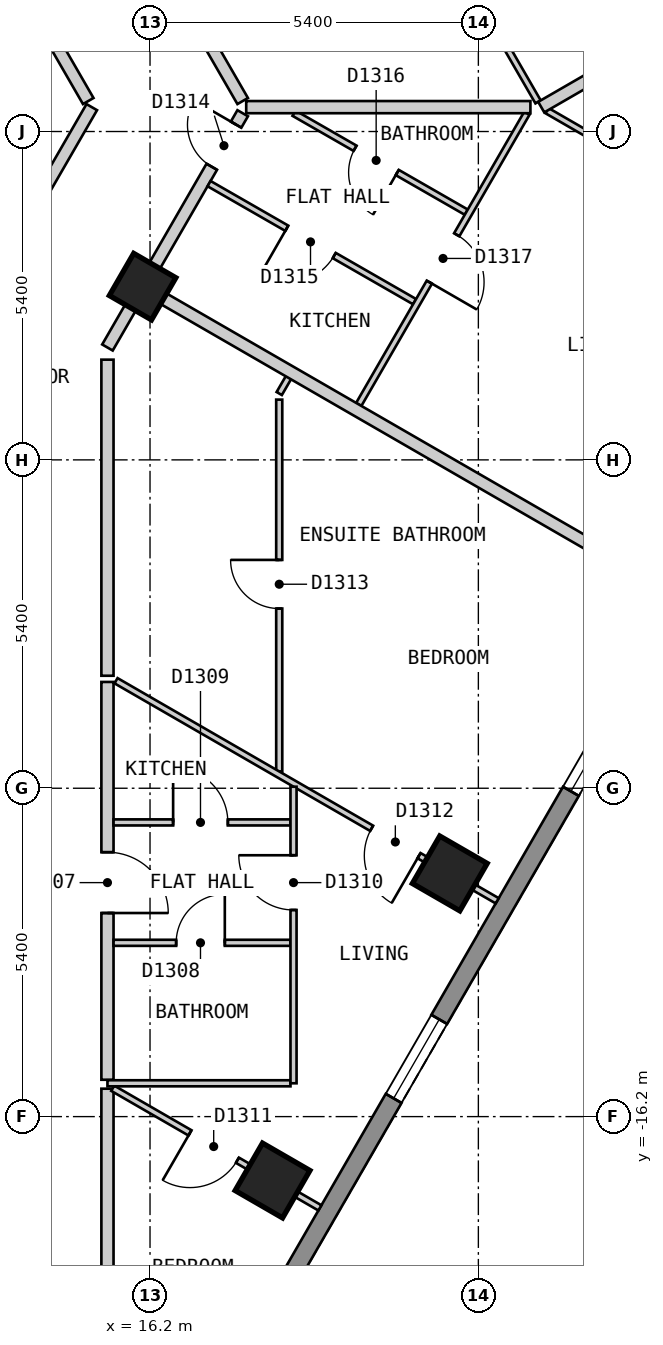
"""IFC4 building model, lengths in metres.
Left out: names, types, materials, properties, quantities, classifications, styles, units other than length and angle.
Written with IfcOpenShell. Run it as: python <this file> out.ifc"""

import sys

from ifc_helpers import new_model, si_unit, direction, frame, frame_2d, origin, origin_2d, place, context, subcontext, project, spatial, polyline, rectangle, outline, extrude, element, fill, save


model = new_model("IFC4")
c1 = context("Model", 3, precision=1e-05, world=origin(), true_north=direction((0.0, 1.0)))
c2 = subcontext(c1, "Body", "Model", "MODEL_VIEW")
j1 = project(units=[si_unit("LENGTHUNIT", "METRE"), si_unit("PLANEANGLEUNIT", "RADIAN")], contexts=[c1])
p1 = place(None, origin())
s1 = spatial("IfcSite", under=j1, at=p1, CompositionType="ELEMENT")
p2 = place(p1, origin())
s2 = spatial("IfcBuilding", under=s1, at=p2, CompositionType="ELEMENT")
p3 = place(p2, frame((0.0, 0.0, 135.6)))
s3 = spatial("IfcBuildingStorey", under=s2, at=p3, CompositionType="ELEMENT", Elevation=135.6)
for number, where, z_axis, x_axis in (
    (1, (18.215, -17.251, 0.0), (0.0, 0.0, 1.0), (0.5, 0.866, 0.0)),
    (2, (21.13, -12.201, 0.0), (0.0, 0.0, 1.0), (0.5, 0.866, 0.0)),
):
    element("IfcColumn", number, at=place(p3, frame(where, z_axis=z_axis, x_axis=x_axis)), inside=s3, PredefinedType="COLUMN", context=c2, shape_type="SweptSolid", body=[
        extrude(rectangle(XDim=0.9, YDim=0.9, at=origin_2d()), origin(), (0.0, 0.0, 1.0), 3.0),
    ])
p4 = place(p3, frame((16.078, -2.551, 0.0), z_axis=(0.0, 0.0, 1.0), x_axis=(0.5, 0.866025403784, 0.0)))
e3 = element("IfcColumn", 3, at=p4, inside=s3, PredefinedType="COLUMN", context=c2, shape_type="SweptSolid", body=[
    extrude(rectangle(XDim=0.8, YDim=0.8, at=origin_2d()), origin(), (0.0, 0.0, 1.0), 3.0),
])
p5 = place(p3, frame((15.862, -23.425, 0.0), z_axis=(0.0, 0.0, 1.0), x_axis=(0.500017503135, 0.866015298109, 0.0)))
e4 = element("IfcWall", 4, at=p5, inside=s3, PredefinedType="SOLIDWALL", context=c2, shape_type="SweptSolid", body=[
    extrude(outline(polyline([(0.0, -0.15), (24.711, -0.15), (24.631, 0.15), (0.08, 0.15), (0.0, -0.15)])), origin(), (0.0, 0.0, 1.0), 2.7),
])
p6 = place(p5, frame((2.857, 0.0, 0.15)))
e5 = element("IfcOpeningElement", 5, at=p6, cuts=e4, PredefinedType="OPENING", context=c2, shape_type="SweptSolid", body=[
    extrude(rectangle(XDim=1.5, YDim=2.1, at=frame_2d((0.75, 1.05))), frame((0.0, 0.16, 0.0), z_axis=(0.0, -1.0, 0.0), x_axis=(1.0, 0.0, 0.0)), (0.0, 0.0, 1.0), 0.32),
])
p7 = place(p5, frame((8.689, 0.0, 0.15)))
e6 = element("IfcOpeningElement", 6, at=p7, cuts=e4, PredefinedType="OPENING", context=c2, shape_type="SweptSolid", body=[
    extrude(rectangle(XDim=1.5, YDim=2.1, at=frame_2d((0.75, 1.05))), frame((0.0, 0.16, 0.0), z_axis=(0.0, -1.0, 0.0), x_axis=(1.0, 0.0, 0.0)), (0.0, 0.0, 1.0), 0.32),
])
p8 = place(p5, frame((14.52, 0.0, 0.15)))
e7 = element("IfcOpeningElement", 7, at=p8, cuts=e4, PredefinedType="OPENING", context=c2, shape_type="SweptSolid", body=[
    extrude(rectangle(XDim=1.5, YDim=2.1, at=frame_2d((0.75, 1.05))), frame((0.0, 0.16, 0.0), z_axis=(0.0, -1.0, 0.0), x_axis=(1.0, 0.0, 0.0)), (0.0, 0.0, 1.0), 0.32),
])
p9 = place(p5, frame((20.351, 0.0, 0.15)))
e8 = element("IfcOpeningElement", 8, at=p9, cuts=e4, PredefinedType="OPENING", context=c2, shape_type="SweptSolid", body=[
    extrude(rectangle(XDim=1.5, YDim=2.1, at=frame_2d((0.75, 1.05))), frame((0.0, 0.16, 0.0), z_axis=(0.0, -1.0, 0.0), x_axis=(1.0, 0.0, 0.0)), (0.0, 0.0, 1.0), 0.32),
])
p10 = place(p3, frame((7.967, 13.0, 0.0), z_axis=(0.0, 0.0, 1.0), x_axis=(0.50003774998, -0.866003607726, 0.0)))
e9 = element("IfcWall", 9, at=p10, inside=s3, PredefinedType="PARTITIONING", context=c2, shape_type="SweptSolid", body=[
    extrude(rectangle(XDim=14.433, YDim=0.2, at=frame_2d((7.217, 0.0))), origin(), (0.0, 0.0, 1.0), 2.7),
])
p11 = place(p10, frame((6.824, 0.0, 0.0)))
e10 = element("IfcOpeningElement", 10, at=p11, cuts=e9, PredefinedType="OPENING", context=c2, shape_type="SweptSolid", body=[
    extrude(rectangle(XDim=0.9, YDim=2.1, at=frame_2d((0.45, 1.05))), frame((0.0, 0.11, 0.0), z_axis=(0.0, -1.0, 0.0), x_axis=(1.0, 0.0, 0.0)), (0.0, 0.0, 1.0), 0.22),
])
p12 = place(p3, frame((9.296, 15.1, 0.0), z_axis=(0.0, 0.0, 1.0), x_axis=(0.499974024244, -0.866040400375, 0.0)))
e11 = element("IfcWall", 11, at=p12, inside=s3, PredefinedType="PARTITIONING", context=c2, shape_type="SweptSolid", body=[
    extrude(rectangle(XDim=16.857, YDim=0.2, at=frame_2d((8.429, 0.0))), origin(), (0.0, 0.0, 1.0), 2.7),
])
p13 = place(p12, frame((5.209, 0.0, 0.0)))
e12 = element("IfcOpeningElement", 12, at=p13, cuts=e11, PredefinedType="OPENING", context=c2, shape_type="SweptSolid", body=[
    extrude(rectangle(XDim=1.0, YDim=2.1, at=frame_2d((0.5, 1.05))), frame((0.0, 0.11, 0.0), z_axis=(0.0, -1.0, 0.0), x_axis=(1.0, 0.0, 0.0)), (0.0, 0.0, 1.0), 0.22),
])
p14 = place(p3, frame((15.5, -3.752, 0.0), z_axis=(0.0, 0.0, 1.0), x_axis=(0.0, -1.0, 0.0)))
e13 = element("IfcWall", 13, at=p14, inside=s3, PredefinedType="PARTITIONING", context=c2, shape_type="SweptSolid", body=[
    extrude(rectangle(XDim=5.198, YDim=0.2, at=frame_2d((2.599, 0.0))), origin(), (0.0, 0.0, 1.0), 2.7),
])
p15 = place(p3, frame((13.394, -2.8, 0.0), z_axis=(0.0, 0.0, 1.0), x_axis=(0.499968324138, 0.866043691079, 0.0)))
e14 = element("IfcWall", 14, at=p15, inside=s3, PredefinedType="PARTITIONING", context=c2, shape_type="SweptSolid", body=[
    extrude(rectangle(XDim=3.696, YDim=0.2, at=frame_2d((1.848, 0.0))), origin(), (0.0, 0.0, 1.0), 2.7),
])
p16 = place(p3, frame((15.5, -3.552, 0.0), z_axis=(0.0, 0.0, 1.0), x_axis=(0.499928303779, 0.86606679366, 0.0)))
e15 = element("IfcWall", 15, at=p16, inside=s3, PredefinedType="PARTITIONING", context=c2, shape_type="SweptSolid", body=[
    extrude(rectangle(XDim=4.449, YDim=0.2, at=frame_2d((2.225, 0.0))), origin(), (0.0, 0.0, 1.0), 2.7),
])
p17 = place(p16, frame((3.432, 0.0, 0.0)))
e16 = element("IfcOpeningElement", 16, at=p17, cuts=e15, PredefinedType="OPENING", context=c2, shape_type="SweptSolid", body=[
    extrude(rectangle(XDim=0.8, YDim=2.1, at=frame_2d((0.4, 1.05))), frame((0.0, 0.11, 0.0), z_axis=(0.0, -1.0, 0.0), x_axis=(1.0, 0.0, 0.0)), (0.0, 0.0, 1.0), 0.22),
])
p18 = place(p3, frame((15.5, -21.199, 0.0), z_axis=(0.0, 0.0, 1.0), x_axis=(0.0, 1.0, 0.0)))
e17 = element("IfcWall", 17, at=p18, inside=s3, PredefinedType="PARTITIONING", context=c2, shape_type="SweptSolid", body=[
    extrude(rectangle(XDim=5.458, YDim=0.2, at=frame_2d((2.729, 0.0))), origin(), (0.0, 0.0, 1.0), 2.7),
])
p19 = place(p3, frame((15.5, -15.594, 0.0), z_axis=(0.0, 0.0, 1.0), x_axis=(0.0, 1.0, 0.0)))
e18 = element("IfcWall", 18, at=p19, inside=s3, PredefinedType="PARTITIONING", context=c2, shape_type="SweptSolid", body=[
    extrude(rectangle(XDim=6.542, YDim=0.2, at=frame_2d((3.271, 0.0))), origin(), (0.0, 0.0, 1.0), 2.7),
])
p20 = place(p19, frame((2.742, 0.0, 0.0)))
e19 = element("IfcOpeningElement", 19, at=p20, cuts=e18, PredefinedType="OPENING", context=c2, shape_type="SweptSolid", body=[
    extrude(rectangle(XDim=1.0, YDim=2.1, at=frame_2d((0.5, 1.05))), frame((0.0, 0.11, 0.0), z_axis=(0.0, -1.0, 0.0), x_axis=(1.0, 0.0, 0.0)), (0.0, 0.0, 1.0), 0.22),
])
p21 = place(p3, frame((11.713, 19.313, 0.0), z_axis=(0.0, 0.0, 1.0), x_axis=(0.499999523185, -0.866025679073, 0.0)))
e20 = element("IfcWall", 20, at=p21, inside=s3, PredefinedType="PARTITIONING", context=c2, shape_type="SweptSolid", body=[
    extrude(rectangle(XDim=21.738, YDim=0.1, at=frame_2d((10.869, 0.0))), origin(), (0.0, 0.0, 1.0), 2.7),
])
p22 = place(p21, frame((7.654, 0.0, 0.0)))
e21 = element("IfcOpeningElement", 21, at=p22, cuts=e20, PredefinedType="OPENING", context=c2, shape_type="SweptSolid", body=[
    extrude(rectangle(XDim=0.9, YDim=2.1, at=frame_2d((0.45, 1.05))), frame((0.0, 0.06, 0.0), z_axis=(0.0, -1.0, 0.0), x_axis=(1.0, 0.0, 0.0)), (0.0, 0.0, 1.0), 0.12),
])
p23 = place(p21, frame((13.202, 0.0, 0.0)))
e22 = element("IfcOpeningElement", 22, at=p23, cuts=e20, PredefinedType="OPENING", context=c2, shape_type="SweptSolid", body=[
    extrude(rectangle(XDim=0.8, YDim=2.1, at=frame_2d((0.4, 1.05))), frame((0.0, 0.06, 0.0), z_axis=(0.0, -1.0, 0.0), x_axis=(1.0, 0.0, 0.0)), (0.0, 0.0, 1.0), 0.12),
])
p24 = place(p21, frame((2.242, 0.0, 0.0)))
e23 = element("IfcOpeningElement", 23, at=p24, cuts=e20, PredefinedType="OPENING", context=c2, shape_type="SweptSolid", body=[
    extrude(rectangle(XDim=0.8, YDim=2.1, at=frame_2d((0.4, 1.05))), frame((0.0, 0.06, 0.0), z_axis=(0.0, -1.0, 0.0), x_axis=(1.0, 0.0, 0.0)), (0.0, 0.0, 1.0), 0.12),
])
p25 = place(p21, frame((18.696, 0.0, 0.0)))
e24 = element("IfcOpeningElement", 24, at=p25, cuts=e20, PredefinedType="OPENING", context=c2, shape_type="SweptSolid", body=[
    extrude(rectangle(XDim=0.8, YDim=2.1, at=frame_2d((0.4, 1.05))), frame((0.0, 0.06, 0.0), z_axis=(0.0, -1.0, 0.0), x_axis=(1.0, 0.0, 0.0)), (0.0, 0.0, 1.0), 0.12),
])
p26 = place(p3, frame((18.325, -4.409, 0.0), z_axis=(0.0, 0.0, 1.0), x_axis=(0.0, -1.0, 0.0)))
e25 = element("IfcWall", 25, at=p26, inside=s3, PredefinedType="PARTITIONING", context=c2, shape_type="SweptSolid", body=[
    extrude(rectangle(XDim=6.115, YDim=0.1, at=frame_2d((3.058, 0.0))), origin(), (0.0, 0.0, 1.0), 2.7),
])
p27 = place(p26, frame((2.636, 0.0, 0.0)))
e26 = element("IfcOpeningElement", 26, at=p27, cuts=e25, PredefinedType="OPENING", context=c2, shape_type="SweptSolid", body=[
    extrude(rectangle(XDim=0.8, YDim=2.1, at=frame_2d((0.4, 1.05))), frame((0.0, 0.06, 0.0), z_axis=(0.0, -1.0, 0.0), x_axis=(1.0, 0.0, 0.0)), (0.0, 0.0, 1.0), 0.12),
])
p28 = place(p3, frame((15.587, -15.734, 0.0), z_axis=(0.0, 0.0, 1.0), x_axis=(0.866023334807, -0.500003583557, 0.0)))
e27 = element("IfcWall", 27, at=p28, inside=s3, PredefinedType="PARTITIONING", context=c2, shape_type="SweptSolid", body=[
    extrude(rectangle(XDim=3.934, YDim=0.1, at=frame_2d((1.967, 0.0))), origin(), (0.0, 0.0, 1.0), 2.7),
])
p29 = place(p28, frame((1.467, 0.0, 0.0)))
e28 = element("IfcOpeningElement", 28, at=p29, cuts=e27, PredefinedType="OPENING", context=c2, shape_type="SweptSolid", body=[
    extrude(rectangle(XDim=0.9, YDim=2.1, at=frame_2d((0.45, 1.05))), frame((0.0, 0.06, 0.0), z_axis=(0.0, -1.0, 0.0), x_axis=(1.0, 0.0, 0.0)), (0.0, 0.0, 1.0), 0.12),
])
p30 = place(p3, frame((15.641, -9.032, 0.0), z_axis=(0.0, 0.0, 1.0), x_axis=(0.866049104564, -0.499958946799, 0.0)))
e29 = element("IfcWall", 29, at=p30, inside=s3, PredefinedType="PARTITIONING", context=c2, shape_type="SweptSolid", body=[
    extrude(rectangle(XDim=7.238, YDim=0.1, at=frame_2d((3.619, 0.0))), origin(), (0.0, 0.0, 1.0), 2.7),
])
p31 = place(p30, frame((4.854, 0.0, 0.0)))
e30 = element("IfcOpeningElement", 30, at=p31, cuts=e29, PredefinedType="OPENING", context=c2, shape_type="SweptSolid", body=[
    extrude(rectangle(XDim=0.9, YDim=2.1, at=frame_2d((0.45, 1.05))), frame((0.0, 0.06, 0.0), z_axis=(0.0, -1.0, 0.0), x_axis=(1.0, 0.0, 0.0)), (0.0, 0.0, 1.0), 0.12),
])
p32 = place(p3, frame((17.171, -0.857, 0.0), z_axis=(0.0, 0.0, 1.0), x_axis=(0.867173455867, -0.49800622229, 0.0)))
e31 = element("IfcWall", 31, at=p32, inside=s3, PredefinedType="PARTITIONING", context=c2, shape_type="SweptSolid", body=[
    extrude(rectangle(XDim=3.898, YDim=0.1, at=frame_2d((1.949, 0.0))), origin(), (0.0, 0.0, 1.0), 2.7),
])
p33 = place(p32, frame((1.474, 0.0, 0.0)))
e32 = element("IfcOpeningElement", 32, at=p33, cuts=e31, PredefinedType="OPENING", context=c2, shape_type="SweptSolid", body=[
    extrude(rectangle(XDim=0.9, YDim=2.1, at=frame_2d((0.45, 1.05))), frame((0.0, 0.06, 0.0), z_axis=(0.0, -1.0, 0.0), x_axis=(1.0, 0.0, 0.0)), (0.0, 0.0, 1.0), 0.12),
])
p34 = place(p3, frame((18.568, 0.301, 0.0), z_axis=(0.0, 0.0, 1.0), x_axis=(0.867155675456, -0.49803718187, 0.0)))
e33 = element("IfcWall", 33, at=p34, inside=s3, PredefinedType="PARTITIONING", context=c2, shape_type="SweptSolid", body=[
    extrude(rectangle(XDim=3.267, YDim=0.1, at=frame_2d((1.633, 0.0))), origin(), (0.0, 0.0, 1.0), 2.7),
])
p35 = place(p34, frame((1.158, 0.0, 0.0)))
e34 = element("IfcOpeningElement", 34, at=p35, cuts=e33, PredefinedType="OPENING", context=c2, shape_type="SweptSolid", body=[
    extrude(rectangle(XDim=0.8, YDim=2.1, at=frame_2d((0.4, 1.05))), frame((0.0, 0.06, 0.0), z_axis=(0.0, -1.0, 0.0), x_axis=(1.0, 0.0, 0.0)), (0.0, 0.0, 1.0), 0.12),
])
p36 = place(p3, frame((22.729, 0.343, 0.0), z_axis=(0.0, 0.0, 1.0), x_axis=(0.865996608848, -0.500049870977, 0.0)))
e35 = element("IfcWall", 35, at=p36, inside=s3, PredefinedType="PARTITIONING", context=c2, shape_type="SweptSolid", body=[
    extrude(rectangle(XDim=5.788, YDim=0.1, at=frame_2d((2.894, 0.0))), origin(), (0.0, 0.0, 1.0), 2.7),
])
p37 = place(p36, frame((2.386, 0.0, 0.0)))
e36 = element("IfcOpeningElement", 36, at=p37, cuts=e35, PredefinedType="OPENING", context=c2, shape_type="SweptSolid", body=[
    extrude(rectangle(XDim=0.9, YDim=2.1, at=frame_2d((0.45, 1.05))), frame((0.0, 0.06, 0.0), z_axis=(0.0, -1.0, 0.0), x_axis=(1.0, 0.0, 0.0)), (0.0, 0.0, 1.0), 0.12),
])
p38 = place(p3, frame((15.6, -11.362, 0.0), z_axis=(0.0, 0.0, 1.0), x_axis=(1.0, 0.0, 0.0)))
e37 = element("IfcWall", 37, at=p38, inside=s3, PredefinedType="PARTITIONING", context=c2, shape_type="SweptSolid", body=[
    extrude(rectangle(XDim=2.91, YDim=0.1, at=frame_2d((1.455, 0.0))), origin(), (0.0, 0.0, 1.0), 2.7),
])
p39 = place(p38, frame((0.98, 0.0, 0.0)))
e38 = element("IfcOpeningElement", 38, at=p39, cuts=e37, PredefinedType="OPENING", context=c2, shape_type="SweptSolid", body=[
    extrude(rectangle(XDim=0.9, YDim=2.1, at=frame_2d((0.45, 1.05))), frame((0.0, 0.06, 0.0), z_axis=(0.0, -1.0, 0.0), x_axis=(1.0, 0.0, 0.0)), (0.0, 0.0, 1.0), 0.12),
])
p40 = place(p3, frame((15.6, -13.342, 0.0), z_axis=(0.0, 0.0, 1.0), x_axis=(1.0, 0.0, 0.0)))
e39 = element("IfcWall", 39, at=p40, inside=s3, PredefinedType="PARTITIONING", context=c2, shape_type="SweptSolid", body=[
    extrude(rectangle(XDim=2.91, YDim=0.1, at=frame_2d((1.455, 0.0))), origin(), (0.0, 0.0, 1.0), 2.7),
])
p41 = place(p40, frame((1.03, 0.0, 0.0)))
e40 = element("IfcOpeningElement", 40, at=p41, cuts=e39, PredefinedType="OPENING", context=c2, shape_type="SweptSolid", body=[
    extrude(rectangle(XDim=0.8, YDim=2.1, at=frame_2d((0.4, 1.05))), frame((0.0, 0.06, 0.0), z_axis=(0.0, -1.0, 0.0), x_axis=(1.0, 0.0, 0.0)), (0.0, 0.0, 1.0), 0.12),
])
p42 = place(p3, frame((15.5, -15.652, 0.0), z_axis=(0.0, 0.0, 1.0), x_axis=(1.0, 0.0, 0.0)))
e41 = element("IfcWall", 41, at=p42, inside=s3, PredefinedType="PARTITIONING", context=c2, shape_type="SweptSolid", body=[
    extrude(rectangle(XDim=3.01, YDim=0.1, at=frame_2d((1.505, 0.0))), origin(), (0.0, 0.0, 1.0), 2.7),
])
p43 = place(p3, frame((18.325, -4.309, 0.0), z_axis=(0.0, 0.0, 1.0), x_axis=(0.5014706583, 0.865174652232, 0.0)))
e42 = element("IfcWall", 42, at=p43, inside=s3, PredefinedType="PARTITIONING", context=c2, shape_type="SweptSolid", body=[
    extrude(rectangle(XDim=0.399, YDim=0.1, at=frame_2d((0.199, 0.0))), origin(), (0.0, 0.0, 1.0), 2.7),
])
p44 = place(p3, frame((19.633, -4.488, 0.0), z_axis=(0.0, 0.0, 1.0), x_axis=(0.499989971015, 0.866031193944, 0.0)))
e43 = element("IfcWall", 43, at=p44, inside=s3, PredefinedType="PARTITIONING", context=c2, shape_type="SweptSolid", body=[
    extrude(rectangle(XDim=5.53, YDim=0.1, at=frame_2d((2.765, 0.0))), origin(), (0.0, 0.0, 1.0), 2.7),
])
p45 = place(p44, frame((2.322, 0.0, 0.0)))
e44 = element("IfcOpeningElement", 44, at=p45, cuts=e43, PredefinedType="OPENING", context=c2, shape_type="SweptSolid", body=[
    extrude(rectangle(XDim=0.9, YDim=2.1, at=frame_2d((0.45, 1.05))), frame((0.0, 0.06, 0.0), z_axis=(0.0, -1.0, 0.0), x_axis=(1.0, 0.0, 0.0)), (0.0, 0.0, 1.0), 0.12),
])
p46 = place(p3, frame((18.56, -15.652, 0.0), z_axis=(0.0, 0.0, 1.0), x_axis=(0.0, 1.0, 0.0)))
e45 = element("IfcWall", 45, at=p46, inside=s3, PredefinedType="PARTITIONING", context=c2, shape_type="SweptSolid", body=[
    extrude(rectangle(XDim=4.877, YDim=0.1, at=frame_2d((2.438, 0.0))), origin(), (0.0, 0.0, 1.0), 2.7),
])
p47 = place(p46, frame((2.85, 0.0, 0.0)))
e46 = element("IfcOpeningElement", 46, at=p47, cuts=e45, PredefinedType="OPENING", context=c2, shape_type="SweptSolid", body=[
    extrude(rectangle(XDim=0.9, YDim=2.1, at=frame_2d((0.45, 1.05))), frame((0.0, 0.06, 0.0), z_axis=(0.0, -1.0, 0.0), x_axis=(1.0, 0.0, 0.0)), (0.0, 0.0, 1.0), 0.12),
])
p48 = place(p3, frame((16.165, -2.601, 0.0), z_axis=(0.0, 0.0, 1.0), x_axis=(0.866016855193, -0.500014806302, 0.0)))
e47 = element("IfcWall", 47, at=p48, inside=s3, PredefinedType="PARTITIONING", context=c2, shape_type="SweptSolid", body=[
    extrude(rectangle(XDim=10.0, YDim=0.2, at=frame_2d((5.0, 0.0))), origin(), (0.0, 0.0, 1.0), 2.7),
])
p49 = place(p3, frame((17.782, 0.401, 0.0), z_axis=(0.0, 0.0, 1.0), x_axis=(1.0, 0.0, 0.0)))
e48 = element("IfcWall", 48, at=p49, inside=s3, PredefinedType="PARTITIONING", context=c2, shape_type="SweptSolid", body=[
    extrude(rectangle(XDim=4.674, YDim=0.2, at=frame_2d((2.337, 0.0))), origin(), (0.0, 0.0, 1.0), 2.7),
])
p50 = place(p3, frame((22.634, 0.401, 0.0), z_axis=(0.0, 0.0, 1.0), x_axis=(0.86601325737, 0.500021037617, 0.0)))
e49 = element("IfcWall", 49, at=p50, inside=s3, PredefinedType="PARTITIONING", context=c2, shape_type="SweptSolid", body=[
    extrude(rectangle(XDim=5.898, YDim=0.2, at=frame_2d((2.949, 0.0))), origin(), (0.0, 0.0, 1.0), 2.7),
])
p51 = place(p7, origin())
e50 = element("IfcWindow", 50, at=p51, inside=s3, PartitioningType="SINGLE_PANEL", PredefinedType="WINDOW", context=c2, shape_type="SweptSolid", body=[
    extrude(rectangle(XDim=1.5, YDim=2.1, at=frame_2d((0.75, 1.05))), frame((0.0, 0.03, 0.0), z_axis=(0.0, -1.0, 0.0), x_axis=(1.0, 0.0, 0.0)), (0.0, 0.0, 1.0), 0.06),
])
fill(e6, e50)
p52 = place(p8, origin())
e51 = element("IfcWindow", 51, at=p52, inside=s3, PartitioningType="SINGLE_PANEL", PredefinedType="WINDOW", context=c2, shape_type="SweptSolid", body=[
    extrude(rectangle(XDim=1.5, YDim=2.1, at=frame_2d((0.75, 1.05))), frame((0.0, 0.03, 0.0), z_axis=(0.0, -1.0, 0.0), x_axis=(1.0, 0.0, 0.0)), (0.0, 0.0, 1.0), 0.06),
])
fill(e7, e51)
p53 = place(p20, origin())
e52 = element("IfcDoor", 52, at=p53, inside=s3, OperationType="SINGLE_SWING_LEFT", PredefinedType="DOOR", context=c2, shape_type="SweptSolid", body=[
    extrude(rectangle(XDim=1.0, YDim=2.1, at=frame_2d((0.5, 1.05))), frame((0.0, 0.025, 0.0), z_axis=(0.0, -1.0, 0.0), x_axis=(1.0, 0.0, 0.0)), (0.0, 0.0, 1.0), 0.05),
])
fill(e19, e52)
p54 = place(p41, origin())
e53 = element("IfcDoor", 53, at=p54, inside=s3, OperationType="SINGLE_SWING_RIGHT", PredefinedType="DOOR", context=c2, shape_type="SweptSolid", body=[
    extrude(rectangle(XDim=0.8, YDim=2.1, at=frame_2d((0.4, 1.05))), frame((0.0, 0.025, 0.0), z_axis=(0.0, -1.0, 0.0), x_axis=(1.0, 0.0, 0.0)), (0.0, 0.0, 1.0), 0.05),
])
fill(e40, e53)
p55 = place(p39, origin())
e54 = element("IfcDoor", 54, at=p55, inside=s3, OperationType="SINGLE_SWING_LEFT", PredefinedType="DOOR", context=c2, shape_type="SweptSolid", body=[
    extrude(rectangle(XDim=0.9, YDim=2.1, at=frame_2d((0.45, 1.05))), frame((0.0, 0.025, 0.0), z_axis=(0.0, -1.0, 0.0), x_axis=(1.0, 0.0, 0.0)), (0.0, 0.0, 1.0), 0.05),
])
fill(e38, e54)
p56 = place(p47, origin())
e55 = element("IfcDoor", 55, at=p56, inside=s3, OperationType="SINGLE_SWING_RIGHT", PredefinedType="DOOR", context=c2, shape_type="SweptSolid", body=[
    extrude(rectangle(XDim=0.9, YDim=2.1, at=frame_2d((0.45, 1.05))), frame((0.0, 0.025, 0.0), z_axis=(0.0, -1.0, 0.0), x_axis=(1.0, 0.0, 0.0)), (0.0, 0.0, 1.0), 0.05),
])
fill(e46, e55)
p57 = place(p29, origin())
e56 = element("IfcDoor", 56, at=p57, inside=s3, OperationType="SINGLE_SWING_LEFT", PredefinedType="DOOR", context=c2, shape_type="SweptSolid", body=[
    extrude(rectangle(XDim=0.9, YDim=2.1, at=frame_2d((0.45, 1.05))), frame((0.0, 0.025, 0.0), z_axis=(0.0, -1.0, 0.0), x_axis=(1.0, 0.0, 0.0)), (0.0, 0.0, 1.0), 0.05),
])
fill(e28, e56)
p58 = place(p31, origin())
e57 = element("IfcDoor", 57, at=p58, inside=s3, OperationType="SINGLE_SWING_RIGHT", PredefinedType="DOOR", context=c2, shape_type="SweptSolid", body=[
    extrude(rectangle(XDim=0.9, YDim=2.1, at=frame_2d((0.45, 1.05))), frame((0.0, 0.025, 0.0), z_axis=(0.0, -1.0, 0.0), x_axis=(1.0, 0.0, 0.0)), (0.0, 0.0, 1.0), 0.05),
])
fill(e30, e57)
p59 = place(p27, origin())
e58 = element("IfcDoor", 58, at=p59, inside=s3, OperationType="SINGLE_SWING_LEFT", PredefinedType="DOOR", context=c2, shape_type="SweptSolid", body=[
    extrude(rectangle(XDim=0.8, YDim=2.1, at=frame_2d((0.4, 1.05))), frame((0.0, 0.025, 0.0), z_axis=(0.0, -1.0, 0.0), x_axis=(1.0, 0.0, 0.0)), (0.0, 0.0, 1.0), 0.05),
])
fill(e26, e58)
p60 = place(p17, origin())
e59 = element("IfcDoor", 59, at=p60, inside=s3, OperationType="SINGLE_SWING_RIGHT", PredefinedType="DOOR", context=c2, shape_type="SweptSolid", body=[
    extrude(rectangle(XDim=0.8, YDim=2.1, at=frame_2d((0.4, 1.05))), frame((0.0, 0.025, 0.0), z_axis=(0.0, -1.0, 0.0), x_axis=(1.0, 0.0, 0.0)), (0.0, 0.0, 1.0), 0.05),
])
fill(e16, e59)
p61 = place(p33, origin())
e60 = element("IfcDoor", 60, at=p61, inside=s3, OperationType="SINGLE_SWING_LEFT", PredefinedType="DOOR", context=c2, shape_type="SweptSolid", body=[
    extrude(rectangle(XDim=0.9, YDim=2.1, at=frame_2d((0.45, 1.05))), frame((0.0, 0.025, 0.0), z_axis=(0.0, -1.0, 0.0), x_axis=(1.0, 0.0, 0.0)), (0.0, 0.0, 1.0), 0.05),
])
fill(e32, e60)
p62 = place(p35, origin())
e61 = element("IfcDoor", 61, at=p62, inside=s3, OperationType="SINGLE_SWING_RIGHT", PredefinedType="DOOR", context=c2, shape_type="SweptSolid", body=[
    extrude(rectangle(XDim=0.8, YDim=2.1, at=frame_2d((0.4, 1.05))), frame((0.0, 0.025, 0.0), z_axis=(0.0, -1.0, 0.0), x_axis=(1.0, 0.0, 0.0)), (0.0, 0.0, 1.0), 0.05),
])
fill(e34, e61)
p63 = place(p45, origin())
e62 = element("IfcDoor", 62, at=p63, inside=s3, OperationType="SINGLE_SWING_LEFT", PredefinedType="DOOR", context=c2, shape_type="SweptSolid", body=[
    extrude(rectangle(XDim=0.9, YDim=2.1, at=frame_2d((0.45, 1.05))), frame((0.0, 0.025, 0.0), z_axis=(0.0, -1.0, 0.0), x_axis=(1.0, 0.0, 0.0)), (0.0, 0.0, 1.0), 0.05),
])
fill(e44, e62)
save(model, sys.argv[1])
